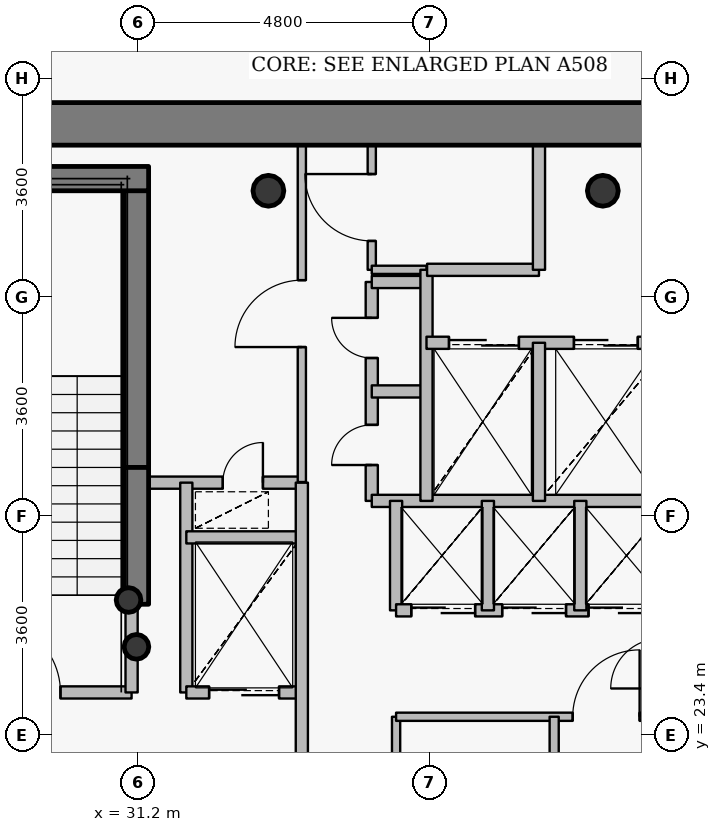
"""IFC4 building model, lengths in metres.
Left out: names, types, materials, properties, quantities, classifications, styles, units other than length and angle.
Written with IfcOpenShell. Run it as: python <this file> out.ifc"""

import sys

from ifc_helpers import new_model, si_unit, direction, frame, frame_2d, origin, origin_2d, place, context, subcontext, project, spatial, rectangle, hollow_circle, extrude, source, transform, mapped, element, fill, save


model = new_model("IFC4")
c1 = context("Model", 3, precision=1e-05, world=origin(), true_north=direction((0.0, 1.0)))
c2 = subcontext(c1, "Body", "Model", "MODEL_VIEW")
j1 = project(units=[si_unit("LENGTHUNIT", "METRE"), si_unit("PLANEANGLEUNIT", "RADIAN")], contexts=[c1])
p1 = place(None, origin())
s1 = spatial("IfcSite", under=j1, at=p1, CompositionType="ELEMENT")
p2 = place(p1, origin())
s2 = spatial("IfcBuilding", under=s1, at=p2, CompositionType="ELEMENT")
p3 = place(p2, frame((0.0, 0.0, 280.5)))
s3 = spatial("IfcBuildingStorey", under=s2, at=p3, CompositionType="ELEMENT", Elevation=280.5)
for number, where, z_axis, x_axis in (
    (1, (38.85, 32.35, 0.0), (0.0, 0.0, 1.0), (1.0, 0.0, 0.0)),
    (2, (33.35, 32.35, 0.0), (0.0, 0.0, 1.0), (1.0, 0.0, 0.0)),
):
    element("IfcColumn", number, at=place(p3, frame(where, z_axis=z_axis, x_axis=x_axis)), inside=s3, PredefinedType="COLUMN", context=c2, shape_type="SweptSolid", body=[
        extrude(hollow_circle(Radius=0.254, WallThickness=0.02, at=origin_2d()), origin(), (0.0, 0.0, 1.0), 3.75),
    ])
p4 = place(p3, frame((31.18, 27.8, 0.0), z_axis=(0.0, 0.0, 1.0), x_axis=(0.0, 1.0, 0.0)))
e3 = element("IfcWall", 3, at=p4, inside=s3, PredefinedType="SHEAR", context=c2, shape_type="SweptSolid", body=[
    extrude(rectangle(XDim=4.75, YDim=0.4, at=frame_2d((2.375, 0.0))), origin(), (0.0, 0.0, 1.0), 3.75),
])
p5 = place(p3, frame((27.25, 32.55, 0.0), z_axis=(0.0, 0.0, 1.0), x_axis=(1.0, 0.0, 0.0)))
e4 = element("IfcWall", 4, at=p5, inside=s3, PredefinedType="SHEAR", context=c2, shape_type="SweptSolid", body=[
    extrude(rectangle(XDim=4.13, YDim=0.4, at=frame_2d((2.065, 0.0))), origin(), (0.0, 0.0, 1.0), 3.75),
])
for number, where, z_axis, x_axis in (
    (5, (31.05, 25.62, 0.0), (0.0, 0.0, 1.0), (1.0, 0.0, 0.0)),
    (6, (31.18, 24.85, 0.0), (0.0, 0.0, 1.0), (1.0, 0.0, 0.0)),
):
    element("IfcColumn", number, at=place(p3, frame(where, z_axis=z_axis, x_axis=x_axis)), inside=s3, PredefinedType="COLUMN", context=c2, shape_type="SweptSolid", body=[
        extrude(hollow_circle(Radius=0.203, WallThickness=0.016, at=origin_2d()), origin(), (0.0, 0.0, 1.0), 3.75),
    ])
p6 = place(p3, frame((27.65, 33.45, 0.0), z_axis=(0.0, 0.0, 1.0), x_axis=(1.0, 0.0, 0.0)))
e7 = element("IfcWall", 7, at=p6, inside=s3, PredefinedType="SHEAR", context=c2, shape_type="SweptSolid", body=[
    extrude(rectangle(XDim=16.7, YDim=0.7, at=frame_2d((8.35, 0.0))), origin(), (0.0, 0.0, 1.0), 3.05),
])
p7 = place(p6, frame((12.775, 0.0, 0.0)))
e8 = element("IfcOpeningElement", 8, at=p7, cuts=e7, PredefinedType="OPENING", context=c2, shape_type="SweptSolid", body=[
    extrude(rectangle(XDim=1.15, YDim=2.15, at=origin_2d()), frame((0.575, 0.36, 1.075), z_axis=(0.0, -1.0, 0.0), x_axis=(1.0, 0.0, 0.0)), (0.0, 0.0, 1.0), 0.72),
])
p8 = place(p3, frame((31.18, 25.55, 0.0), z_axis=(0.0, 0.0, 1.0), x_axis=(0.0, 1.0, 0.0)))
e9 = element("IfcWall", 9, at=p8, inside=s3, PredefinedType="SHEAR", context=c2, shape_type="SweptSolid", body=[
    extrude(rectangle(XDim=2.25, YDim=0.4, at=frame_2d((1.125, 0.0))), origin(), (0.0, 0.0, 1.0), 3.1),
])
p9 = place(p3, frame((27.56, 24.1, 0.0), z_axis=(0.0, 0.0, 1.0), x_axis=(1.0, 0.0, 0.0)))
e10 = element("IfcWall", 10, at=p9, inside=s3, PredefinedType="PARTITIONING", context=c2, shape_type="SweptSolid", body=[
    extrude(rectangle(XDim=3.54, YDim=0.2, at=frame_2d((1.77, 0.0))), origin(), (0.0, 0.0, 1.0), 3.5),
])
p10 = place(p9, frame((1.17, 0.0, 0.0)))
e11 = element("IfcOpeningElement", 11, at=p10, cuts=e10, PredefinedType="OPENING", context=c2, shape_type="SweptSolid", body=[
    extrude(rectangle(XDim=1.2, YDim=2.15, at=origin_2d()), frame((0.6, 0.11, 1.075), z_axis=(0.0, -1.0, 0.0), x_axis=(1.0, 0.0, 0.0)), (0.0, 0.0, 1.0), 0.22),
])
p11 = place(p3, frame((31.1, 24.1, 0.0), z_axis=(0.0, 0.0, 1.0), x_axis=(0.0, 1.0, 0.0)))
e12 = element("IfcWall", 12, at=p11, inside=s3, PredefinedType="PARTITIONING", context=c2, shape_type="SweptSolid", body=[
    extrude(rectangle(XDim=1.44, YDim=0.2, at=frame_2d((0.72, 0.0))), origin(), (0.0, 0.0, 1.0), 3.5),
])
p12 = place(p3, frame((31.1, 27.55, 0.0), z_axis=(0.0, 0.0, 1.0), x_axis=(1.0, 0.0, 0.0)))
e13 = element("IfcWall", 13, at=p12, inside=s3, PredefinedType="PARTITIONING", context=c2, shape_type="SweptSolid", body=[
    extrude(rectangle(XDim=2.8, YDim=0.2, at=frame_2d((1.4, 0.0))), origin(), (0.0, 0.0, 1.0), 3.085),
])
p13 = place(p12, frame((1.5, 0.0, 0.0)))
e14 = element("IfcOpeningElement", 14, at=p13, cuts=e13, PredefinedType="OPENING", context=c2, shape_type="SweptSolid", body=[
    extrude(rectangle(XDim=0.66, YDim=2.05, at=origin_2d()), frame((0.33, 0.11, 1.025), z_axis=(0.0, -1.0, 0.0), x_axis=(1.0, 0.0, 0.0)), (0.0, 0.0, 1.0), 0.22),
])
p14 = place(p3, frame((32.0, 24.1, 0.0), z_axis=(0.0, 0.0, 1.0), x_axis=(0.0, 1.0, 0.0)))
e15 = element("IfcWall", 15, at=p14, inside=s3, PredefinedType="PARTITIONING", context=c2, shape_type="SweptSolid", body=[
    extrude(rectangle(XDim=3.45, YDim=0.2, at=frame_2d((1.725, 0.0))), origin(), (0.0, 0.0, 1.0), 3.5),
])
p15 = place(p3, frame((32.0, 24.1, 0.0), z_axis=(0.0, 0.0, 1.0), x_axis=(1.0, 0.0, 0.0)))
e16 = element("IfcWall", 16, at=p15, inside=s3, PredefinedType="PARTITIONING", context=c2, shape_type="SweptSolid", body=[
    extrude(rectangle(XDim=1.9, YDim=0.2, at=frame_2d((0.95, 0.0))), origin(), (0.0, 0.0, 1.0), 3.085),
])
p16 = place(p15, frame((0.375, 0.0, 0.0)))
e17 = element("IfcOpeningElement", 17, at=p16, cuts=e16, PredefinedType="OPENING", context=c2, shape_type="SweptSolid", body=[
    extrude(rectangle(XDim=1.15, YDim=2.15, at=origin_2d()), frame((0.575, 0.11, 1.075), z_axis=(0.0, -1.0, 0.0), x_axis=(1.0, 0.0, 0.0)), (0.0, 0.0, 1.0), 0.22),
])
p17 = place(p3, frame((32.0, 26.65, 0.0), z_axis=(0.0, 0.0, 1.0), x_axis=(1.0, 0.0, 0.0)))
e18 = element("IfcWall", 18, at=p17, inside=s3, PredefinedType="PARTITIONING", context=c2, shape_type="SweptSolid", body=[
    extrude(rectangle(XDim=1.9, YDim=0.2, at=frame_2d((0.95, 0.0))), origin(), (0.0, 0.0, 1.0), 3.085),
])
p18 = place(p3, frame((33.9, 20.9, 0.0), z_axis=(0.0, 0.0, 1.0), x_axis=(0.0, 1.0, 0.0)))
e19 = element("IfcWall", 19, at=p18, inside=s3, PredefinedType="PARTITIONING", context=c2, shape_type="SweptSolid", body=[
    extrude(rectangle(XDim=6.65, YDim=0.2, at=frame_2d((3.325, 0.0))), origin(), (0.0, 0.0, 1.0), 3.085),
])
p19 = place(p3, frame((33.9, 27.56, 0.0), z_axis=(0.0, 0.0, 1.0), x_axis=(0.0, 1.0, 0.0)))
e20 = element("IfcWall", 20, at=p19, inside=s3, PredefinedType="PARTITIONING", context=c2, shape_type="SweptSolid", body=[
    extrude(rectangle(XDim=5.54, YDim=0.135, at=frame_2d((2.77, 0.0))), origin(), (0.0, 0.0, 1.0), 3.085),
])
p20 = place(p19, frame((2.22, 0.0, 0.0)))
e21 = element("IfcOpeningElement", 21, at=p20, cuts=e20, PredefinedType="OPENING", context=c2, shape_type="SweptSolid", body=[
    extrude(rectangle(XDim=1.1, YDim=2.15, at=origin_2d()), frame((0.55, 0.078, 1.075), z_axis=(0.0, -1.0, 0.0), x_axis=(1.0, 0.0, 0.0)), (0.0, 0.0, 1.0), 0.155),
])
p21 = place(p3, frame((35.05, 27.25, 0.0), z_axis=(0.0, 0.0, 1.0), x_axis=(0.0, 1.0, 0.0)))
e22 = element("IfcWall", 22, at=p21, inside=s3, PredefinedType="PARTITIONING", context=c2, shape_type="SweptSolid", body=[
    extrude(rectangle(XDim=3.6, YDim=0.2, at=frame_2d((1.8, 0.0))), origin(), (0.0, 0.0, 1.0), 3.5),
])
p22 = place(p21, frame((0.59, 0.0, 0.0)))
e23 = element("IfcOpeningElement", 23, at=p22, cuts=e22, PredefinedType="OPENING", context=c2, shape_type="SweptSolid", body=[
    extrude(rectangle(XDim=0.66, YDim=2.05, at=origin_2d()), frame((0.33, 0.11, 1.025), z_axis=(0.0, -1.0, 0.0), x_axis=(1.0, 0.0, 0.0)), (0.0, 0.0, 1.0), 0.22),
])
p23 = place(p21, frame((2.35, 0.0, 0.0)))
e24 = element("IfcOpeningElement", 24, at=p23, cuts=e22, PredefinedType="OPENING", context=c2, shape_type="SweptSolid", body=[
    extrude(rectangle(XDim=0.66, YDim=2.05, at=origin_2d()), frame((0.33, 0.11, 1.025), z_axis=(0.0, -1.0, 0.0), x_axis=(1.0, 0.0, 0.0)), (0.0, 0.0, 1.0), 0.22),
])
p24 = place(p3, frame((35.05, 27.25, 0.0), z_axis=(0.0, 0.0, 1.0), x_axis=(1.0, 0.0, 0.0)))
e25 = element("IfcWall", 25, at=p24, inside=s3, PredefinedType="PARTITIONING", context=c2, shape_type="SweptSolid", body=[
    extrude(rectangle(XDim=4.95, YDim=0.2, at=frame_2d((2.475, 0.0))), origin(), (0.0, 0.0, 1.0), 3.085),
])
for number, where, z_axis, x_axis in (
    (26, (35.05, 29.05, 0.0), (0.0, 0.0, 1.0), (1.0, 0.0, 0.0)),
    (27, (35.05, 30.85, 0.0), (0.0, 0.0, 1.0), (1.0, 0.0, 0.0)),
):
    element("IfcWall", number, at=place(p3, frame(where, z_axis=z_axis, x_axis=x_axis)), inside=s3, PredefinedType="PARTITIONING", context=c2, shape_type="SweptSolid", body=[
        extrude(rectangle(XDim=0.9, YDim=0.2, at=frame_2d((0.45, 0.0))), origin(), (0.0, 0.0, 1.0), 3.5),
    ])
p25 = place(p3, frame((35.05, 31.05, 0.0), z_axis=(0.0, 0.0, 1.0), x_axis=(0.0, 1.0, 0.0)))
e28 = element("IfcWall", 28, at=p25, inside=s3, PredefinedType="PARTITIONING", context=c2, shape_type="SweptSolid", body=[
    extrude(rectangle(XDim=2.05, YDim=0.135, at=frame_2d((1.025, 0.0))), origin(), (0.0, 0.0, 1.0), 3.085),
])
p26 = place(p25, frame((0.475, 0.0, 0.0)))
e29 = element("IfcOpeningElement", 29, at=p26, cuts=e28, PredefinedType="OPENING", context=c2, shape_type="SweptSolid", body=[
    extrude(rectangle(XDim=1.1, YDim=2.15, at=origin_2d()), frame((0.55, 0.078, 1.075), z_axis=(0.0, -1.0, 0.0), x_axis=(1.0, 0.0, 0.0)), (0.0, 0.0, 1.0), 0.155),
])
p27 = place(p3, frame((35.05, 31.05, 0.0), z_axis=(0.0, 0.0, 1.0), x_axis=(1.0, 0.0, 0.0)))
e30 = element("IfcWall", 30, at=p27, inside=s3, PredefinedType="PARTITIONING", context=c2, shape_type="SweptSolid", body=[
    extrude(rectangle(XDim=0.9, YDim=0.135, at=frame_2d((0.45, 0.0))), origin(), (0.0, 0.0, 1.0), 3.5),
])
p28 = place(p3, frame((35.45, 20.9, 0.0), z_axis=(0.0, 0.0, 1.0), x_axis=(0.0, 1.0, 0.0)))
e31 = element("IfcWall", 31, at=p28, inside=s3, PredefinedType="PARTITIONING", context=c2, shape_type="SweptSolid", body=[
    extrude(rectangle(XDim=2.8, YDim=0.135, at=frame_2d((1.4, 0.0))), origin(), (0.0, 0.0, 1.0), 3.085),
])
p29 = place(p28, frame((0.85, 0.0, 0.0)))
e32 = element("IfcOpeningElement", 32, at=p29, cuts=e31, PredefinedType="OPENING", context=c2, shape_type="SweptSolid", body=[
    extrude(rectangle(XDim=1.1, YDim=2.15, at=origin_2d()), frame((0.55, 0.078, 1.075), z_axis=(0.0, -1.0, 0.0), x_axis=(1.0, 0.0, 0.0)), (0.0, 0.0, 1.0), 0.155),
])
p30 = place(p3, frame((35.45, 23.7, 0.0), z_axis=(0.0, 0.0, 1.0), x_axis=(1.0, 0.0, 0.0)))
e33 = element("IfcWall", 33, at=p30, inside=s3, PredefinedType="PARTITIONING", context=c2, shape_type="SweptSolid", body=[
    extrude(rectangle(XDim=4.35, YDim=0.135, at=frame_2d((2.175, 0.0))), origin(), (0.0, 0.0, 1.0), 3.085),
])
p31 = place(p30, frame((2.905, 0.0, 0.0)))
e34 = element("IfcOpeningElement", 34, at=p31, cuts=e33, PredefinedType="OPENING", context=c2, shape_type="SweptSolid", body=[
    extrude(rectangle(XDim=1.1, YDim=2.15, at=origin_2d()), frame((0.55, 0.078, 1.075), z_axis=(0.0, -1.0, 0.0), x_axis=(1.0, 0.0, 0.0)), (0.0, 0.0, 1.0), 0.155),
])
p32 = place(p3, frame((35.45, 25.45, 0.0), z_axis=(0.0, 0.0, 1.0), x_axis=(0.0, 1.0, 0.0)))
e35 = element("IfcWall", 35, at=p32, inside=s3, PredefinedType="PARTITIONING", context=c2, shape_type="SweptSolid", body=[
    extrude(rectangle(XDim=1.8, YDim=0.2, at=frame_2d((0.9, 0.0))), origin(), (0.0, 0.0, 1.0), 3.5),
])
p33 = place(p3, frame((35.45, 25.45, 0.0), z_axis=(0.0, 0.0, 1.0), x_axis=(1.0, 0.0, 0.0)))
e36 = element("IfcWall", 36, at=p33, inside=s3, PredefinedType="PARTITIONING", context=c2, shape_type="SweptSolid", body=[
    extrude(rectangle(XDim=4.55, YDim=0.2, at=frame_2d((2.275, 0.0))), origin(), (0.0, 0.0, 1.0), 3.085),
])
p34 = place(p33, frame((0.25, 0.0, 0.0)))
e37 = element("IfcOpeningElement", 37, at=p34, cuts=e36, PredefinedType="OPENING", context=c2, shape_type="SweptSolid", body=[
    extrude(rectangle(XDim=1.05, YDim=2.15, at=origin_2d()), frame((0.525, 0.11, 1.075), z_axis=(0.0, -1.0, 0.0), x_axis=(1.0, 0.0, 0.0)), (0.0, 0.0, 1.0), 0.22),
])
p35 = place(p33, frame((1.745, 0.0, 0.0)))
e38 = element("IfcOpeningElement", 38, at=p35, cuts=e36, PredefinedType="OPENING", context=c2, shape_type="SweptSolid", body=[
    extrude(rectangle(XDim=1.05, YDim=2.15, at=origin_2d()), frame((0.525, 0.11, 1.075), z_axis=(0.0, -1.0, 0.0), x_axis=(1.0, 0.0, 0.0)), (0.0, 0.0, 1.0), 0.22),
])
p36 = place(p33, frame((3.165, 0.0, 0.0)))
e39 = element("IfcOpeningElement", 39, at=p36, cuts=e36, PredefinedType="OPENING", context=c2, shape_type="SweptSolid", body=[
    extrude(rectangle(XDim=1.05, YDim=2.15, at=origin_2d()), frame((0.525, 0.11, 1.075), z_axis=(0.0, -1.0, 0.0), x_axis=(1.0, 0.0, 0.0)), (0.0, 0.0, 1.0), 0.22),
])
p37 = place(p3, frame((35.95, 27.25, 0.0), z_axis=(0.0, 0.0, 1.0), x_axis=(0.0, 1.0, 0.0)))
e40 = element("IfcWall", 40, at=p37, inside=s3, PredefinedType="PARTITIONING", context=c2, shape_type="SweptSolid", body=[
    extrude(rectangle(XDim=3.8, YDim=0.2, at=frame_2d((1.9, 0.0))), origin(), (0.0, 0.0, 1.0), 3.5),
])
p38 = place(p3, frame((35.95, 29.85, 0.0), z_axis=(0.0, 0.0, 1.0), x_axis=(1.0, 0.0, 0.0)))
e41 = element("IfcWall", 41, at=p38, inside=s3, PredefinedType="PARTITIONING", context=c2, shape_type="SweptSolid", body=[
    extrude(rectangle(XDim=8.49, YDim=0.2, at=frame_2d((4.245, 0.0))), origin(), (0.0, 0.0, 1.0), 3.085),
])
p39 = place(p38, frame((6.1, 0.0, 0.0)))
e42 = element("IfcOpeningElement", 42, at=p39, cuts=e41, PredefinedType="OPENING", context=c2, shape_type="SweptSolid", body=[
    extrude(rectangle(XDim=1.2, YDim=2.15, at=origin_2d()), frame((0.6, 0.11, 1.075), z_axis=(0.0, -1.0, 0.0), x_axis=(1.0, 0.0, 0.0)), (0.0, 0.0, 1.0), 0.22),
])
p40 = place(p38, frame((0.37, 0.0, 0.0)))
e43 = element("IfcOpeningElement", 43, at=p40, cuts=e41, PredefinedType="OPENING", context=c2, shape_type="SweptSolid", body=[
    extrude(rectangle(XDim=1.15, YDim=2.15, at=origin_2d()), frame((0.575, 0.11, 1.075), z_axis=(0.0, -1.0, 0.0), x_axis=(1.0, 0.0, 0.0)), (0.0, 0.0, 1.0), 0.22),
])
p41 = place(p38, frame((2.425, 0.0, 0.0)))
e44 = element("IfcOpeningElement", 44, at=p41, cuts=e41, PredefinedType="OPENING", context=c2, shape_type="SweptSolid", body=[
    extrude(rectangle(XDim=1.05, YDim=2.15, at=origin_2d()), frame((0.525, 0.11, 1.075), z_axis=(0.0, -1.0, 0.0), x_axis=(1.0, 0.0, 0.0)), (0.0, 0.0, 1.0), 0.22),
])
p42 = place(p3, frame((35.96, 31.05, 0.0), z_axis=(0.0, 0.0, 1.0), x_axis=(1.0, 0.0, 0.0)))
e45 = element("IfcWall", 45, at=p42, inside=s3, PredefinedType="PARTITIONING", context=c2, shape_type="SweptSolid", body=[
    extrude(rectangle(XDim=1.84, YDim=0.2, at=frame_2d((0.92, 0.0))), origin(), (0.0, 0.0, 1.0), 3.5),
])
p43 = place(p3, frame((36.96, 25.45, 0.0), z_axis=(0.0, 0.0, 1.0), x_axis=(0.0, 1.0, 0.0)))
e46 = element("IfcWall", 46, at=p43, inside=s3, PredefinedType="PARTITIONING", context=c2, shape_type="SweptSolid", body=[
    extrude(rectangle(XDim=1.8, YDim=0.2, at=frame_2d((0.9, 0.0))), origin(), (0.0, 0.0, 1.0), 3.5),
])
p44 = place(p3, frame((37.8, 27.25, 0.0), z_axis=(0.0, 0.0, 1.0), x_axis=(0.0, 1.0, 0.0)))
e47 = element("IfcWall", 47, at=p44, inside=s3, PredefinedType="PARTITIONING", context=c2, shape_type="SweptSolid", body=[
    extrude(rectangle(XDim=2.6, YDim=0.2, at=frame_2d((1.3, 0.0))), origin(), (0.0, 0.0, 1.0), 3.5),
])
p45 = place(p3, frame((37.8, 31.05, 0.0), z_axis=(0.0, 0.0, 1.0), x_axis=(0.0, 1.0, 0.0)))
e48 = element("IfcWall", 48, at=p45, inside=s3, PredefinedType="PARTITIONING", context=c2, shape_type="SweptSolid", body=[
    extrude(rectangle(XDim=2.05, YDim=0.2, at=frame_2d((1.025, 0.0))), origin(), (0.0, 0.0, 1.0), 3.085),
])
p46 = place(p3, frame((38.05, 20.38, 0.0), z_axis=(0.0, 0.0, 1.0), x_axis=(0.0, 1.0, 0.0)))
e49 = element("IfcWall", 49, at=p46, inside=s3, PredefinedType="PARTITIONING", context=c2, shape_type="SweptSolid", body=[
    extrude(rectangle(XDim=3.32, YDim=0.15, at=frame_2d((1.66, 0.0))), origin(), (0.0, 0.0, 1.0), 3.035),
])
p47 = place(p3, frame((38.48, 25.45, 0.0), z_axis=(0.0, 0.0, 1.0), x_axis=(0.0, 1.0, 0.0)))
e50 = element("IfcWall", 50, at=p47, inside=s3, PredefinedType="PARTITIONING", context=c2, shape_type="SweptSolid", body=[
    extrude(rectangle(XDim=1.8, YDim=0.2, at=frame_2d((0.9, 0.0))), origin(), (0.0, 0.0, 1.0), 3.5),
])
m1 = source(origin(), c2, "Body", "SweptSolid", [
    extrude(rectangle(XDim=1.2, YDim=2.15, at=origin_2d()), frame((0.6, 0.025, 1.075), z_axis=(0.0, -1.0, 0.0), x_axis=(1.0, 0.0, 0.0)), (0.0, 0.0, 1.0), 0.05),
])
p48 = place(p10, origin())
e51 = element("IfcDoor", 51, at=p48, inside=s3, OperationType="SINGLE_SWING_LEFT", PredefinedType="DOOR", context=c2, shape_type="MappedRepresentation", body=[
    mapped(m1, transform((0.0, 0.0, 0.0), x_axis=(1.0, 0.0, 0.0), y_axis=(0.0, 1.0, 0.0), z_axis=(0.0, 0.0, 1.0), scale=1.0)),
])
fill(e11, e51)
m2 = source(origin(), c2, "Body", "SweptSolid", [
    extrude(rectangle(XDim=1.15, YDim=2.15, at=origin_2d()), frame((0.575, 0.025, 1.075), z_axis=(0.0, -1.0, 0.0), x_axis=(1.0, 0.0, 0.0)), (0.0, 0.0, 1.0), 0.05),
])
p49 = place(p40, origin())
e52 = element("IfcDoor", 52, at=p49, inside=s3, OperationType="DOUBLE_DOOR_SLIDING", PredefinedType="USERDEFINED", context=c2, shape_type="MappedRepresentation", body=[
    mapped(m2, transform((0.0, 0.0, 0.0), x_axis=(1.0, 0.0, 0.0), y_axis=(0.0, 1.0, 0.0), z_axis=(0.0, 0.0, 1.0), scale=1.0)),
])
fill(e43, e52)
p50 = place(p16, origin())
e53 = element("IfcDoor", 53, at=p50, inside=s3, OperationType="DOUBLE_DOOR_SLIDING", PredefinedType="USERDEFINED", context=c2, shape_type="MappedRepresentation", body=[
    mapped(m2, transform((0.0, 0.0, 0.0), x_axis=(1.0, 0.0, 0.0), y_axis=(0.0, 1.0, 0.0), z_axis=(0.0, 0.0, 1.0), scale=1.0)),
])
fill(e17, e53)
m3 = source(origin(), c2, "Body", "SweptSolid", [
    extrude(rectangle(XDim=1.05, YDim=2.15, at=origin_2d()), frame((0.525, 0.025, 1.075), z_axis=(0.0, -1.0, 0.0), x_axis=(1.0, 0.0, 0.0)), (0.0, 0.0, 1.0), 0.05),
])
p51 = place(p41, origin())
e54 = element("IfcDoor", 54, at=p51, inside=s3, OperationType="DOUBLE_DOOR_SLIDING", PredefinedType="USERDEFINED", context=c2, shape_type="MappedRepresentation", body=[
    mapped(m3, transform((0.0, 0.0, 0.0), x_axis=(1.0, 0.0, 0.0), y_axis=(0.0, 1.0, 0.0), z_axis=(0.0, 0.0, 1.0), scale=1.0)),
])
fill(e44, e54)
p52 = place(p34, origin())
e55 = element("IfcDoor", 55, at=p52, inside=s3, OperationType="DOUBLE_DOOR_SLIDING", PredefinedType="USERDEFINED", context=c2, shape_type="MappedRepresentation", body=[
    mapped(m3, transform((0.0, 0.0, 0.0), x_axis=(1.0, 0.0, 0.0), y_axis=(0.0, 1.0, 0.0), z_axis=(0.0, 0.0, 1.0), scale=1.0)),
])
fill(e37, e55)
p53 = place(p35, origin())
e56 = element("IfcDoor", 56, at=p53, inside=s3, OperationType="DOUBLE_DOOR_SLIDING", PredefinedType="USERDEFINED", context=c2, shape_type="MappedRepresentation", body=[
    mapped(m3, transform((0.0, 0.0, 0.0), x_axis=(1.0, 0.0, 0.0), y_axis=(0.0, 1.0, 0.0), z_axis=(0.0, 0.0, 1.0), scale=1.0)),
])
fill(e38, e56)
p54 = place(p36, origin())
e57 = element("IfcDoor", 57, at=p54, inside=s3, OperationType="DOUBLE_DOOR_SLIDING", PredefinedType="USERDEFINED", context=c2, shape_type="MappedRepresentation", body=[
    mapped(m3, transform((0.0, 0.0, 0.0), x_axis=(1.0, 0.0, 0.0), y_axis=(0.0, 1.0, 0.0), z_axis=(0.0, 0.0, 1.0), scale=1.0)),
])
fill(e39, e57)
m4 = source(origin(), c2, "Body", "SweptSolid", [
    extrude(rectangle(XDim=0.66, YDim=2.05, at=origin_2d()), frame((0.33, 0.025, 1.025), z_axis=(0.0, -1.0, 0.0), x_axis=(1.0, 0.0, 0.0)), (0.0, 0.0, 1.0), 0.05),
])
p55 = place(p22, origin())
e58 = element("IfcDoor", 58, at=p55, inside=s3, OperationType="SINGLE_SWING_LEFT", PredefinedType="USERDEFINED", context=c2, shape_type="MappedRepresentation", body=[
    mapped(m4, transform((0.0, 0.0, 0.0), x_axis=(1.0, 0.0, 0.0), y_axis=(0.0, 1.0, 0.0), z_axis=(0.0, 0.0, 1.0), scale=1.0)),
])
fill(e23, e58)
p56 = place(p23, origin())
e59 = element("IfcDoor", 59, at=p56, inside=s3, OperationType="SINGLE_SWING_RIGHT", PredefinedType="USERDEFINED", context=c2, shape_type="MappedRepresentation", body=[
    mapped(m4, transform((0.0, 0.0, 0.0), x_axis=(1.0, 0.0, 0.0), y_axis=(0.0, 1.0, 0.0), z_axis=(0.0, 0.0, 1.0), scale=1.0)),
])
fill(e24, e59)
m5 = source(origin(), c2, "Body", "SweptSolid", [
    extrude(rectangle(XDim=1.1, YDim=2.15, at=origin_2d()), frame((0.55, 0.025, 1.075), z_axis=(0.0, -1.0, 0.0), x_axis=(1.0, 0.0, 0.0)), (0.0, 0.0, 1.0), 0.05),
])
p57 = place(p31, origin())
e60 = element("IfcDoor", 60, at=p57, inside=s3, OperationType="SINGLE_SWING_RIGHT", PredefinedType="DOOR", context=c2, shape_type="MappedRepresentation", body=[
    mapped(m5, transform((0.0, 0.0, 0.0), x_axis=(1.0, 0.0, 0.0), y_axis=(0.0, 1.0, 0.0), z_axis=(0.0, 0.0, 1.0), scale=1.0)),
])
fill(e34, e60)
p58 = place(p20, origin())
e61 = element("IfcDoor", 61, at=p58, inside=s3, OperationType="SINGLE_SWING_LEFT", PredefinedType="DOOR", context=c2, shape_type="MappedRepresentation", body=[
    mapped(m5, transform((0.0, 0.0, 0.0), x_axis=(1.0, 0.0, 0.0), y_axis=(0.0, 1.0, 0.0), z_axis=(0.0, 0.0, 1.0), scale=1.0)),
])
fill(e21, e61)
p59 = place(p26, origin())
e62 = element("IfcDoor", 62, at=p59, inside=s3, OperationType="SINGLE_SWING_RIGHT", PredefinedType="DOOR", context=c2, shape_type="MappedRepresentation", body=[
    mapped(m5, transform((0.0, 0.0, 0.0), x_axis=(1.0, 0.0, 0.0), y_axis=(0.0, 1.0, 0.0), z_axis=(0.0, 0.0, 1.0), scale=1.0)),
])
fill(e29, e62)
p60 = place(p13, origin())
e63 = element("IfcDoor", 63, at=p60, inside=s3, OperationType="SINGLE_SWING_RIGHT", PredefinedType="USERDEFINED", context=c2, shape_type="MappedRepresentation", body=[
    mapped(m4, transform((0.0, 0.0, 0.0), x_axis=(1.0, 0.0, 0.0), y_axis=(0.0, 1.0, 0.0), z_axis=(0.0, 0.0, 1.0), scale=1.0)),
])
fill(e14, e63)
save(model, sys.argv[1])
